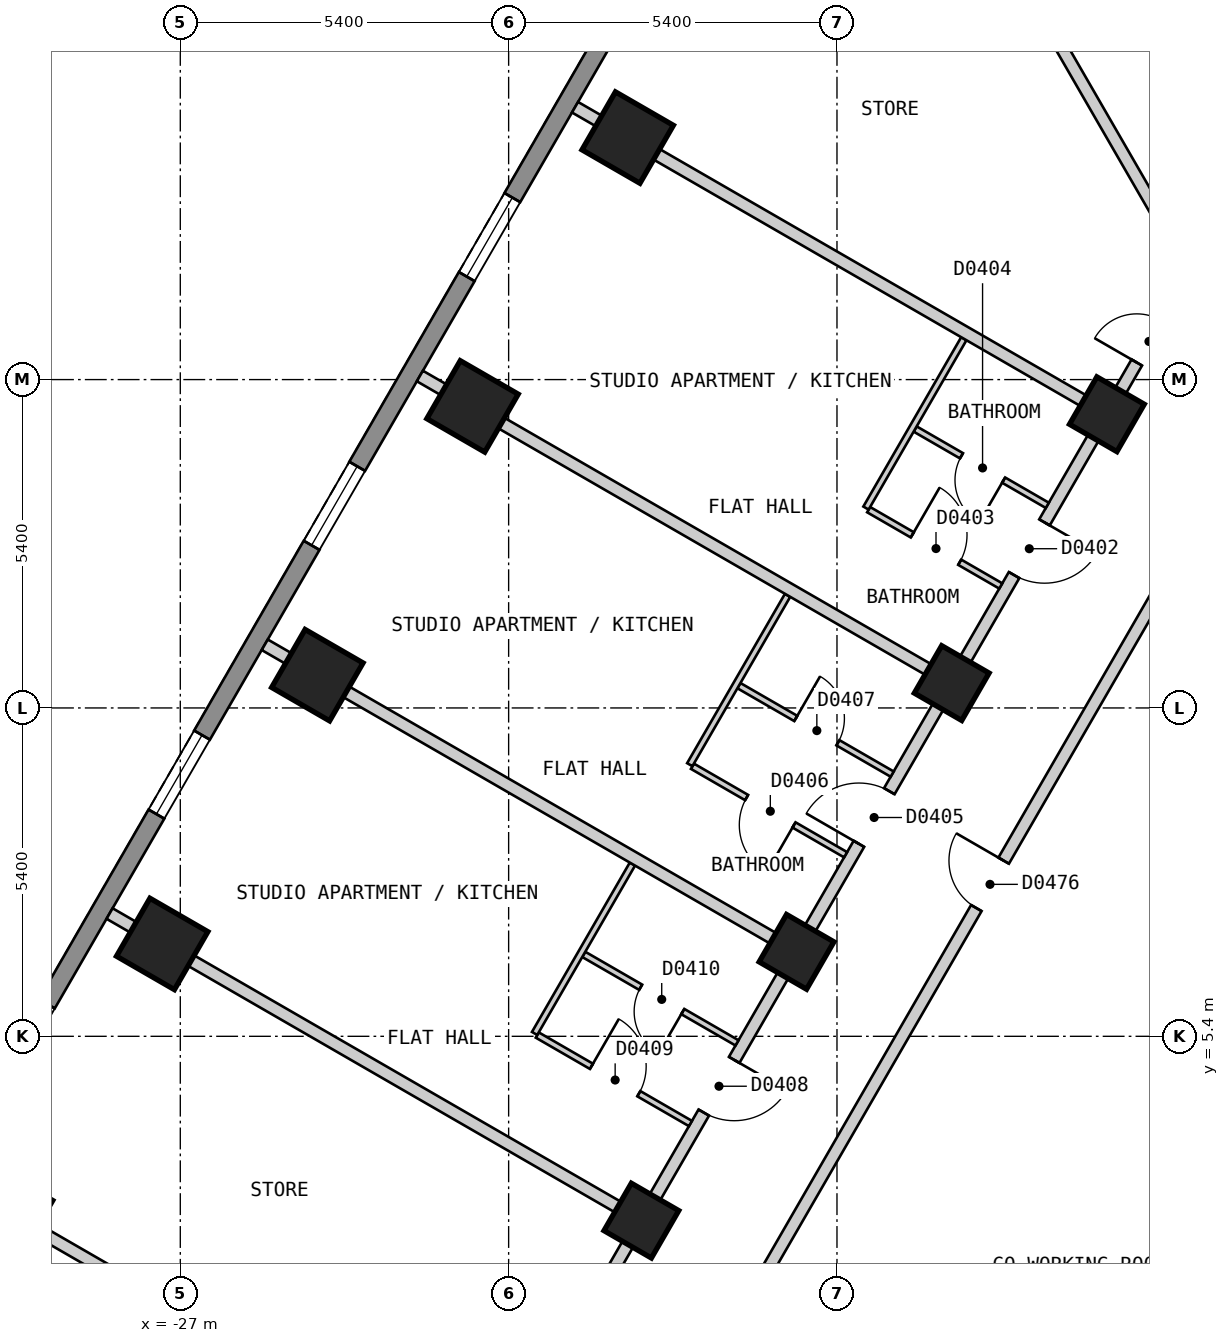
"""IFC4 building model, lengths in metres.
Left out: names, types, materials, properties, quantities, classifications, styles, units other than length and angle.
Written with IfcOpenShell. Run it as: python <this file> out.ifc"""

import sys

from ifc_helpers import new_model, si_unit, direction, frame, frame_2d, origin, origin_2d, place, context, subcontext, project, spatial, polyline, rectangle, outline, extrude, element, fill, save


model = new_model("IFC4")
c1 = context("Model", 3, precision=1e-05, world=origin(), true_north=direction((0.0, 1.0)))
c2 = subcontext(c1, "Body", "Model", "MODEL_VIEW")
j1 = project(units=[si_unit("LENGTHUNIT", "METRE"), si_unit("PLANEANGLEUNIT", "RADIAN")], contexts=[c1])
p1 = place(None, origin())
s1 = spatial("IfcSite", under=j1, at=p1, CompositionType="ELEMENT")
p2 = place(p1, origin())
s2 = spatial("IfcBuilding", under=s1, at=p2, CompositionType="ELEMENT")
p3 = place(p2, frame((0.0, 0.0, 32.4)))
s3 = spatial("IfcBuildingStorey", under=s2, at=p3, CompositionType="ELEMENT", Elevation=32.4)
for number, where, z_axis, x_axis in (
    (1, (-19.642, 20.18, 0.0), (0.0, 0.0, 1.0), (-0.5, -0.866, 0.0)),
    (2, (-22.194, 15.759, 0.0), (0.0, 0.0, 1.0), (-0.5, -0.866, 0.0)),
    (3, (-24.746, 11.339, 0.0), (0.0, 0.0, 1.0), (-0.5, -0.866, 0.0)),
    (4, (-27.298, 6.919, 0.0), (0.0, 0.0, 1.0), (-0.5, -0.866, 0.0)),
    (5, (-29.849, 2.499, 0.0), (0.0, 0.0, 1.0), (-0.5, -0.866, 0.0)),
):
    element("IfcColumn", number, at=place(p3, frame(where, z_axis=z_axis, x_axis=x_axis)), inside=s3, PredefinedType="COLUMN", context=c2, shape_type="SweptSolid", body=[
        extrude(rectangle(XDim=1.1, YDim=1.1, at=origin_2d()), origin(), (0.0, 0.0, 1.0), 3.0),
    ])
for number, where, z_axis, x_axis in (
    (6, (-11.761, 15.63, 0.0), (0.0, 0.0, 1.0), (-0.5, -0.866, 0.0)),
    (7, (-14.313, 11.209, 0.0), (0.0, 0.0, 1.0), (-0.5, -0.866, 0.0)),
    (8, (-16.865, 6.789, 0.0), (0.0, 0.0, 1.0), (-0.5, -0.866, 0.0)),
    (9, (-19.417, 2.369, 0.0), (0.0, 0.0, 1.0), (-0.5, -0.866, 0.0)),
):
    element("IfcColumn", number, at=place(p3, frame(where, z_axis=z_axis, x_axis=x_axis)), inside=s3, PredefinedType="COLUMN", context=c2, shape_type="SweptSolid", body=[
        extrude(rectangle(XDim=0.9, YDim=0.9, at=origin_2d()), origin(), (0.0, 0.0, 1.0), 3.0),
    ])
p4 = place(p3, frame((-17.71, 25.825, 0.0), z_axis=(0.0, 0.0, 1.0), x_axis=(-0.500001938803, -0.866024284413, 0.0)))
e10 = element("IfcWall", 10, at=p4, inside=s3, PredefinedType="SOLIDWALL", context=c2, shape_type="SweptSolid", body=[
    extrude(outline(polyline([(0.0, -0.15), (27.02, -0.15), (26.94, 0.15), (0.08, 0.15), (0.0, -0.15)])), origin(), (0.0, 0.0, 1.0), 2.7),
])
p5 = place(p4, frame((2.553, 0.0, 0.15)))
e11 = element("IfcOpeningElement", 11, at=p5, cuts=e10, PredefinedType="OPENING", context=c2, shape_type="SweptSolid", body=[
    extrude(rectangle(XDim=1.5, YDim=2.1, at=frame_2d((0.75, 1.05))), frame((0.0, 0.16, 0.0), z_axis=(0.0, -1.0, 0.0), x_axis=(1.0, 0.0, 0.0)), (0.0, 0.0, 1.0), 0.32),
])
p6 = place(p4, frame((7.658, 0.0, 0.15)))
e12 = element("IfcOpeningElement", 12, at=p6, cuts=e10, PredefinedType="OPENING", context=c2, shape_type="SweptSolid", body=[
    extrude(rectangle(XDim=1.5, YDim=2.1, at=frame_2d((0.75, 1.05))), frame((0.0, 0.16, 0.0), z_axis=(0.0, -1.0, 0.0), x_axis=(1.0, 0.0, 0.0)), (0.0, 0.0, 1.0), 0.32),
])
p7 = place(p4, frame((12.761, 0.0, 0.15)))
e13 = element("IfcOpeningElement", 13, at=p7, cuts=e10, PredefinedType="OPENING", context=c2, shape_type="SweptSolid", body=[
    extrude(rectangle(XDim=1.5, YDim=2.1, at=frame_2d((0.75, 1.05))), frame((0.0, 0.16, 0.0), z_axis=(0.0, -1.0, 0.0), x_axis=(1.0, 0.0, 0.0)), (0.0, 0.0, 1.0), 0.32),
])
p8 = place(p4, frame((17.865, 0.0, 0.15)))
e14 = element("IfcOpeningElement", 14, at=p8, cuts=e10, PredefinedType="OPENING", context=c2, shape_type="SweptSolid", body=[
    extrude(rectangle(XDim=1.5, YDim=2.1, at=frame_2d((0.75, 1.05))), frame((0.0, 0.16, 0.0), z_axis=(0.0, -1.0, 0.0), x_axis=(1.0, 0.0, 0.0)), (0.0, 0.0, 1.0), 0.32),
])
p9 = place(p4, frame((22.969, 0.0, 0.15)))
e15 = element("IfcOpeningElement", 15, at=p9, cuts=e10, PredefinedType="OPENING", context=c2, shape_type="SweptSolid", body=[
    extrude(rectangle(XDim=1.5, YDim=2.1, at=frame_2d((0.75, 1.05))), frame((0.0, 0.16, 0.0), z_axis=(0.0, -1.0, 0.0), x_axis=(1.0, 0.0, 0.0)), (0.0, 0.0, 1.0), 0.32),
])
p10 = place(p3, frame((-18.244, -0.001, 0.0), z_axis=(0.0, 0.0, 1.0), x_axis=(0.499962999376, 0.866046765051, 0.0)))
e16 = element("IfcWall", 16, at=p10, inside=s3, PredefinedType="PARTITIONING", context=c2, shape_type="SweptSolid", body=[
    extrude(rectangle(XDim=18.245, YDim=0.2, at=frame_2d((9.123, 0.0))), origin(), (0.0, 0.0, 1.0), 2.7),
])
p11 = place(p10, frame((8.672, 0.0, 0.0)))
e17 = element("IfcOpeningElement", 17, at=p11, cuts=e16, PredefinedType="OPENING", context=c2, shape_type="SweptSolid", body=[
    extrude(rectangle(XDim=0.9, YDim=2.1, at=frame_2d((0.45, 1.05))), frame((0.0, 0.11, 0.0), z_axis=(0.0, -1.0, 0.0), x_axis=(1.0, 0.0, 0.0)), (0.0, 0.0, 1.0), 0.22),
])
p12 = place(p3, frame((-20.727, 0.099, 0.0), z_axis=(0.0, 0.0, 1.0), x_axis=(0.499993204491, 0.866029327138, 0.0)))
e18 = element("IfcWall", 18, at=p12, inside=s3, PredefinedType="PARTITIONING", context=c2, shape_type="SweptSolid", body=[
    extrude(rectangle(XDim=20.554, YDim=0.2, at=frame_2d((10.277, 0.0))), origin(), (0.0, 0.0, 1.0), 2.7),
])
p13 = place(p12, frame((18.916, 0.0, 0.0)))
e19 = element("IfcOpeningElement", 19, at=p13, cuts=e18, PredefinedType="OPENING", context=c2, shape_type="SweptSolid", body=[
    extrude(rectangle(XDim=0.8, YDim=2.1, at=frame_2d((0.4, 1.05))), frame((0.0, 0.11, 0.0), z_axis=(0.0, -1.0, 0.0), x_axis=(1.0, 0.0, 0.0)), (0.0, 0.0, 1.0), 0.22),
])
p14 = place(p12, frame((14.88, 0.0, 0.0)))
e20 = element("IfcOpeningElement", 20, at=p14, cuts=e18, PredefinedType="OPENING", context=c2, shape_type="SweptSolid", body=[
    extrude(rectangle(XDim=1.0, YDim=2.1, at=frame_2d((0.5, 1.05))), frame((0.0, 0.11, 0.0), z_axis=(0.0, -1.0, 0.0), x_axis=(1.0, 0.0, 0.0)), (0.0, 0.0, 1.0), 0.22),
])
p15 = place(p12, frame((9.776, 0.0, 0.0)))
e21 = element("IfcOpeningElement", 21, at=p15, cuts=e18, PredefinedType="OPENING", context=c2, shape_type="SweptSolid", body=[
    extrude(rectangle(XDim=1.0, YDim=2.1, at=frame_2d((0.5, 1.05))), frame((0.0, 0.11, 0.0), z_axis=(0.0, -1.0, 0.0), x_axis=(1.0, 0.0, 0.0)), (0.0, 0.0, 1.0), 0.22),
])
p16 = place(p12, frame((4.673, 0.0, 0.0)))
e22 = element("IfcOpeningElement", 22, at=p16, cuts=e18, PredefinedType="OPENING", context=c2, shape_type="SweptSolid", body=[
    extrude(rectangle(XDim=1.0, YDim=2.1, at=frame_2d((0.5, 1.05))), frame((0.0, 0.11, 0.0), z_axis=(0.0, -1.0, 0.0), x_axis=(1.0, 0.0, 0.0)), (0.0, 0.0, 1.0), 0.22),
])
p17 = place(p12, frame((0.838, 0.0, 0.0)))
e23 = element("IfcOpeningElement", 23, at=p17, cuts=e18, PredefinedType="OPENING", context=c2, shape_type="SweptSolid", body=[
    extrude(rectangle(XDim=0.8, YDim=2.1, at=frame_2d((0.4, 1.05))), frame((0.0, 0.11, 0.0), z_axis=(0.0, -1.0, 0.0), x_axis=(1.0, 0.0, 0.0)), (0.0, 0.0, 1.0), 0.22),
])
p18 = place(p3, frame((-20.364, 6.747, 0.0), z_axis=(0.0, 0.0, 1.0), x_axis=(0.866003949776, -0.500037157592, 0.0)))
e24 = element("IfcWall", 24, at=p18, inside=s3, PredefinedType="PARTITIONING", context=c2, shape_type="SweptSolid", body=[
    extrude(rectangle(XDim=2.91, YDim=0.1, at=frame_2d((1.455, 0.0))), origin(), (0.0, 0.0, 1.0), 2.7),
])
p19 = place(p18, frame((1.08, 0.0, 0.0)))
e25 = element("IfcOpeningElement", 25, at=p19, cuts=e24, PredefinedType="OPENING", context=c2, shape_type="SweptSolid", body=[
    extrude(rectangle(XDim=0.8, YDim=2.1, at=frame_2d((0.4, 1.05))), frame((0.0, 0.06, 0.0), z_axis=(0.0, -1.0, 0.0), x_axis=(1.0, 0.0, 0.0)), (0.0, 0.0, 1.0), 0.12),
])
p20 = place(p3, frame((-21.129, 5.421, 0.0), z_axis=(0.0, 0.0, 1.0), x_axis=(0.865935355752, -0.500155935342, 0.0)))
e26 = element("IfcWall", 26, at=p20, inside=s3, PredefinedType="PARTITIONING", context=c2, shape_type="SweptSolid", body=[
    extrude(rectangle(XDim=2.909, YDim=0.1, at=frame_2d((1.454, 0.0))), origin(), (0.0, 0.0, 1.0), 2.7),
])
p21 = place(p20, frame((1.029, 0.0, 0.0)))
e27 = element("IfcOpeningElement", 27, at=p21, cuts=e26, PredefinedType="OPENING", context=c2, shape_type="SweptSolid", body=[
    extrude(rectangle(XDim=0.9, YDim=2.1, at=frame_2d((0.45, 1.05))), frame((0.0, 0.06, 0.0), z_axis=(0.0, -1.0, 0.0), x_axis=(1.0, 0.0, 0.0)), (0.0, 0.0, 1.0), 0.12),
])
p22 = place(p3, frame((-18.577, 9.841, 0.0), z_axis=(0.0, 0.0, 1.0), x_axis=(0.865899003441, -0.500218867937, 0.0)))
e28 = element("IfcWall", 28, at=p22, inside=s3, PredefinedType="PARTITIONING", context=c2, shape_type="SweptSolid", body=[
    extrude(rectangle(XDim=2.909, YDim=0.1, at=frame_2d((1.455, 0.0))), origin(), (0.0, 0.0, 1.0), 2.7),
])
p23 = place(p22, frame((1.029, 0.0, 0.0)))
e29 = element("IfcOpeningElement", 29, at=p23, cuts=e28, PredefinedType="OPENING", context=c2, shape_type="SweptSolid", body=[
    extrude(rectangle(XDim=0.9, YDim=2.1, at=frame_2d((0.45, 1.05))), frame((0.0, 0.06, 0.0), z_axis=(0.0, -1.0, 0.0), x_axis=(1.0, 0.0, 0.0)), (0.0, 0.0, 1.0), 0.12),
])
p24 = place(p3, frame((-15.679, 14.061, 0.0), z_axis=(0.0, 0.0, 1.0), x_axis=(0.865916579361, -0.500188442078, 0.0)))
e30 = element("IfcWall", 30, at=p24, inside=s3, PredefinedType="PARTITIONING", context=c2, shape_type="SweptSolid", body=[
    extrude(rectangle(XDim=2.509, YDim=0.1, at=frame_2d((1.255, 0.0))), origin(), (0.0, 0.0, 1.0), 2.7),
])
p25 = place(p24, frame((0.829, 0.0, 0.0)))
e31 = element("IfcOpeningElement", 31, at=p25, cuts=e30, PredefinedType="OPENING", context=c2, shape_type="SweptSolid", body=[
    extrude(rectangle(XDim=0.9, YDim=2.1, at=frame_2d((0.45, 1.05))), frame((0.0, 0.06, 0.0), z_axis=(0.0, -1.0, 0.0), x_axis=(1.0, 0.0, 0.0)), (0.0, 0.0, 1.0), 0.12),
])
p26 = place(p3, frame((-14.914, 15.387, 0.0), z_axis=(0.0, 0.0, 1.0), x_axis=(0.865983051302, -0.500073349477, 0.0)))
e32 = element("IfcWall", 32, at=p26, inside=s3, PredefinedType="PARTITIONING", context=c2, shape_type="SweptSolid", body=[
    extrude(rectangle(XDim=2.509, YDim=0.1, at=frame_2d((1.255, 0.0))), origin(), (0.0, 0.0, 1.0), 2.7),
])
p27 = place(p26, frame((0.88, 0.0, 0.0)))
e33 = element("IfcOpeningElement", 33, at=p27, cuts=e32, PredefinedType="OPENING", context=c2, shape_type="SweptSolid", body=[
    extrude(rectangle(XDim=0.8, YDim=2.1, at=frame_2d((0.4, 1.05))), frame((0.0, 0.06, 0.0), z_axis=(0.0, -1.0, 0.0), x_axis=(1.0, 0.0, 0.0)), (0.0, 0.0, 1.0), 0.12),
])
p28 = place(p3, frame((-17.813, 11.167, 0.0), z_axis=(0.0, 0.0, 1.0), x_axis=(0.866087824531, -0.499891868507, 0.0)))
e34 = element("IfcWall", 34, at=p28, inside=s3, PredefinedType="PARTITIONING", context=c2, shape_type="SweptSolid", body=[
    extrude(rectangle(XDim=2.911, YDim=0.1, at=frame_2d((1.456, 0.0))), origin(), (0.0, 0.0, 1.0), 2.7),
])
p29 = place(p28, frame((1.08, 0.0, 0.0)))
e35 = element("IfcOpeningElement", 35, at=p29, cuts=e34, PredefinedType="OPENING", context=c2, shape_type="SweptSolid", body=[
    extrude(rectangle(XDim=0.8, YDim=2.1, at=frame_2d((0.4, 1.05))), frame((0.0, 0.06, 0.0), z_axis=(0.0, -1.0, 0.0), x_axis=(1.0, 0.0, 0.0)), (0.0, 0.0, 1.0), 0.12),
])
p30 = place(p3, frame((-15.723, 14.087, 0.0), z_axis=(0.0, 0.0, 1.0), x_axis=(0.500204249835, 0.865907447969, 0.0)))
e36 = element("IfcWall", 36, at=p30, inside=s3, PredefinedType="PARTITIONING", context=c2, shape_type="SweptSolid", body=[
    extrude(rectangle(XDim=3.217, YDim=0.1, at=frame_2d((1.608, 0.0))), origin(), (0.0, 0.0, 1.0), 2.7),
])
p31 = place(p3, frame((-21.173, 5.447, 0.0), z_axis=(0.0, 0.0, 1.0), x_axis=(0.500162542782, 0.865931539325, 0.0)))
e37 = element("IfcWall", 37, at=p31, inside=s3, PredefinedType="PARTITIONING", context=c2, shape_type="SweptSolid", body=[
    extrude(rectangle(XDim=3.217, YDim=0.1, at=frame_2d((1.609, 0.0))), origin(), (0.0, 0.0, 1.0), 2.7),
])
p32 = place(p3, frame((-18.621, 9.867, 0.0), z_axis=(0.0, 0.0, 1.0), x_axis=(0.500197891286, 0.865911121047, 0.0)))
e38 = element("IfcWall", 38, at=p32, inside=s3, PredefinedType="PARTITIONING", context=c2, shape_type="SweptSolid", body=[
    extrude(rectangle(XDim=3.215, YDim=0.1, at=frame_2d((1.607, 0.0))), origin(), (0.0, 0.0, 1.0), 2.7),
])
p33 = place(p3, frame((-12.659, 21.926, 0.0), z_axis=(0.0, 0.0, 1.0), x_axis=(0.500025458316, -0.86601070492, 0.0)))
e39 = element("IfcWall", 39, at=p33, inside=s3, PredefinedType="PARTITIONING", context=c2, shape_type="SweptSolid", body=[
    extrude(rectangle(XDim=4.533, YDim=0.2, at=frame_2d((2.267, 0.0))), origin(), (0.0, 0.0, 1.0), 2.7),
])
p34 = place(p3, frame((-28.163, 7.419, 0.0), z_axis=(0.0, 0.0, 1.0), x_axis=(0.866022959057, -0.500004234368, 0.0)))
e40 = element("IfcWall", 40, at=p34, inside=s3, PredefinedType="PARTITIONING", context=c2, shape_type="SweptSolid", body=[
    extrude(rectangle(XDim=10.0, YDim=0.2, at=frame_2d((5.0, 0.0))), origin(), (0.0, 0.0, 1.0), 2.7),
])
p35 = place(p3, frame((-30.716, 2.999, 0.0), z_axis=(0.0, 0.0, 1.0), x_axis=(0.866032775405, -0.499987231761, 0.0)))
e41 = element("IfcWall", 41, at=p35, inside=s3, PredefinedType="PARTITIONING", context=c2, shape_type="SweptSolid", body=[
    extrude(rectangle(XDim=5.8, YDim=0.2, at=frame_2d((2.9, 0.0))), origin(), (0.0, 0.0, 1.0), 2.7),
])
p36 = place(p3, frame((-25.611, 11.839, 0.0), z_axis=(0.0, 0.0, 1.0), x_axis=(0.866022959057, -0.500004234368, 0.0)))
e42 = element("IfcWall", 42, at=p36, inside=s3, PredefinedType="PARTITIONING", context=c2, shape_type="SweptSolid", body=[
    extrude(rectangle(XDim=10.0, YDim=0.2, at=frame_2d((5.0, 0.0))), origin(), (0.0, 0.0, 1.0), 2.7),
])
for number, where, z_axis, x_axis in (
    (43, (-20.508, 20.679, 0.0), (0.0, 0.0, 1.0), (0.866, -0.5, 0.0)),
    (44, (-23.06, 16.259, 0.0), (0.0, 0.0, 1.0), (0.866, -0.5, 0.0)),
):
    element("IfcWall", number, at=place(p3, frame(where, z_axis=z_axis, x_axis=x_axis)), inside=s3, PredefinedType="PARTITIONING", context=c2, shape_type="SweptSolid", body=[
        extrude(rectangle(XDim=10.001, YDim=0.2, at=frame_2d((5.0, 0.0))), origin(), (0.0, 0.0, 1.0), 2.7),
    ])
p37 = place(p6, origin())
e45 = element("IfcWindow", 45, at=p37, inside=s3, PartitioningType="SINGLE_PANEL", PredefinedType="WINDOW", context=c2, shape_type="SweptSolid", body=[
    extrude(rectangle(XDim=1.5, YDim=2.1, at=frame_2d((0.75, 1.05))), frame((0.0, 0.03, 0.0), z_axis=(0.0, -1.0, 0.0), x_axis=(1.0, 0.0, 0.0)), (0.0, 0.0, 1.0), 0.06),
])
fill(e12, e45)
p38 = place(p7, origin())
e46 = element("IfcWindow", 46, at=p38, inside=s3, PartitioningType="SINGLE_PANEL", PredefinedType="WINDOW", context=c2, shape_type="SweptSolid", body=[
    extrude(rectangle(XDim=1.5, YDim=2.1, at=frame_2d((0.75, 1.05))), frame((0.0, 0.03, 0.0), z_axis=(0.0, -1.0, 0.0), x_axis=(1.0, 0.0, 0.0)), (0.0, 0.0, 1.0), 0.06),
])
fill(e13, e46)
p39 = place(p8, origin())
e47 = element("IfcWindow", 47, at=p39, inside=s3, PartitioningType="SINGLE_PANEL", PredefinedType="WINDOW", context=c2, shape_type="SweptSolid", body=[
    extrude(rectangle(XDim=1.5, YDim=2.1, at=frame_2d((0.75, 1.05))), frame((0.0, 0.03, 0.0), z_axis=(0.0, -1.0, 0.0), x_axis=(1.0, 0.0, 0.0)), (0.0, 0.0, 1.0), 0.06),
])
fill(e14, e47)
p40 = place(p13, origin())
e48 = element("IfcDoor", 48, at=p40, inside=s3, OperationType="SINGLE_SWING_LEFT", PredefinedType="DOOR", context=c2, shape_type="SweptSolid", body=[
    extrude(rectangle(XDim=0.8, YDim=2.1, at=frame_2d((0.4, 1.05))), frame((0.0, 0.025, 0.0), z_axis=(0.0, -1.0, 0.0), x_axis=(1.0, 0.0, 0.0)), (0.0, 0.0, 1.0), 0.05),
])
fill(e19, e48)
p41 = place(p14, origin())
e49 = element("IfcDoor", 49, at=p41, inside=s3, OperationType="SINGLE_SWING_RIGHT", PredefinedType="DOOR", context=c2, shape_type="SweptSolid", body=[
    extrude(rectangle(XDim=1.0, YDim=2.1, at=frame_2d((0.5, 1.05))), frame((0.0, 0.025, 0.0), z_axis=(0.0, -1.0, 0.0), x_axis=(1.0, 0.0, 0.0)), (0.0, 0.0, 1.0), 0.05),
])
fill(e20, e49)
p42 = place(p25, origin())
e50 = element("IfcDoor", 50, at=p42, inside=s3, OperationType="SINGLE_SWING_LEFT", PredefinedType="DOOR", context=c2, shape_type="SweptSolid", body=[
    extrude(rectangle(XDim=0.9, YDim=2.1, at=frame_2d((0.45, 1.05))), frame((0.0, 0.025, 0.0), z_axis=(0.0, -1.0, 0.0), x_axis=(1.0, 0.0, 0.0)), (0.0, 0.0, 1.0), 0.05),
])
fill(e31, e50)
p43 = place(p27, origin())
e51 = element("IfcDoor", 51, at=p43, inside=s3, OperationType="SINGLE_SWING_RIGHT", PredefinedType="DOOR", context=c2, shape_type="SweptSolid", body=[
    extrude(rectangle(XDim=0.8, YDim=2.1, at=frame_2d((0.4, 1.05))), frame((0.0, 0.025, 0.0), z_axis=(0.0, -1.0, 0.0), x_axis=(1.0, 0.0, 0.0)), (0.0, 0.0, 1.0), 0.05),
])
fill(e33, e51)
p44 = place(p15, origin())
e52 = element("IfcDoor", 52, at=p44, inside=s3, OperationType="SINGLE_SWING_LEFT", PredefinedType="DOOR", context=c2, shape_type="SweptSolid", body=[
    extrude(rectangle(XDim=1.0, YDim=2.1, at=frame_2d((0.5, 1.05))), frame((0.0, 0.025, 0.0), z_axis=(0.0, -1.0, 0.0), x_axis=(1.0, 0.0, 0.0)), (0.0, 0.0, 1.0), 0.05),
])
fill(e21, e52)
p45 = place(p23, origin())
e53 = element("IfcDoor", 53, at=p45, inside=s3, OperationType="SINGLE_SWING_RIGHT", PredefinedType="DOOR", context=c2, shape_type="SweptSolid", body=[
    extrude(rectangle(XDim=0.9, YDim=2.1, at=frame_2d((0.45, 1.05))), frame((0.0, 0.025, 0.0), z_axis=(0.0, -1.0, 0.0), x_axis=(1.0, 0.0, 0.0)), (0.0, 0.0, 1.0), 0.05),
])
fill(e29, e53)
p46 = place(p29, origin())
e54 = element("IfcDoor", 54, at=p46, inside=s3, OperationType="SINGLE_SWING_LEFT", PredefinedType="DOOR", context=c2, shape_type="SweptSolid", body=[
    extrude(rectangle(XDim=0.8, YDim=2.1, at=frame_2d((0.4, 1.05))), frame((0.0, 0.025, 0.0), z_axis=(0.0, -1.0, 0.0), x_axis=(1.0, 0.0, 0.0)), (0.0, 0.0, 1.0), 0.05),
])
fill(e35, e54)
p47 = place(p16, origin())
e55 = element("IfcDoor", 55, at=p47, inside=s3, OperationType="SINGLE_SWING_RIGHT", PredefinedType="DOOR", context=c2, shape_type="SweptSolid", body=[
    extrude(rectangle(XDim=1.0, YDim=2.1, at=frame_2d((0.5, 1.05))), frame((0.0, 0.025, 0.0), z_axis=(0.0, -1.0, 0.0), x_axis=(1.0, 0.0, 0.0)), (0.0, 0.0, 1.0), 0.05),
])
fill(e22, e55)
p48 = place(p21, origin())
e56 = element("IfcDoor", 56, at=p48, inside=s3, OperationType="SINGLE_SWING_LEFT", PredefinedType="DOOR", context=c2, shape_type="SweptSolid", body=[
    extrude(rectangle(XDim=0.9, YDim=2.1, at=frame_2d((0.45, 1.05))), frame((0.0, 0.025, 0.0), z_axis=(0.0, -1.0, 0.0), x_axis=(1.0, 0.0, 0.0)), (0.0, 0.0, 1.0), 0.05),
])
fill(e27, e56)
p49 = place(p19, origin())
e57 = element("IfcDoor", 57, at=p49, inside=s3, OperationType="SINGLE_SWING_RIGHT", PredefinedType="DOOR", context=c2, shape_type="SweptSolid", body=[
    extrude(rectangle(XDim=0.8, YDim=2.1, at=frame_2d((0.4, 1.05))), frame((0.0, 0.025, 0.0), z_axis=(0.0, -1.0, 0.0), x_axis=(1.0, 0.0, 0.0)), (0.0, 0.0, 1.0), 0.05),
])
fill(e25, e57)
p50 = place(p11, origin())
e58 = element("IfcDoor", 58, at=p50, inside=s3, OperationType="SINGLE_SWING_RIGHT", PredefinedType="DOOR", context=c2, shape_type="SweptSolid", body=[
    extrude(rectangle(XDim=0.9, YDim=2.1, at=frame_2d((0.45, 1.05))), frame((0.0, 0.025, 0.0), z_axis=(0.0, -1.0, 0.0), x_axis=(1.0, 0.0, 0.0)), (0.0, 0.0, 1.0), 0.05),
])
fill(e17, e58)
save(model, sys.argv[1])
